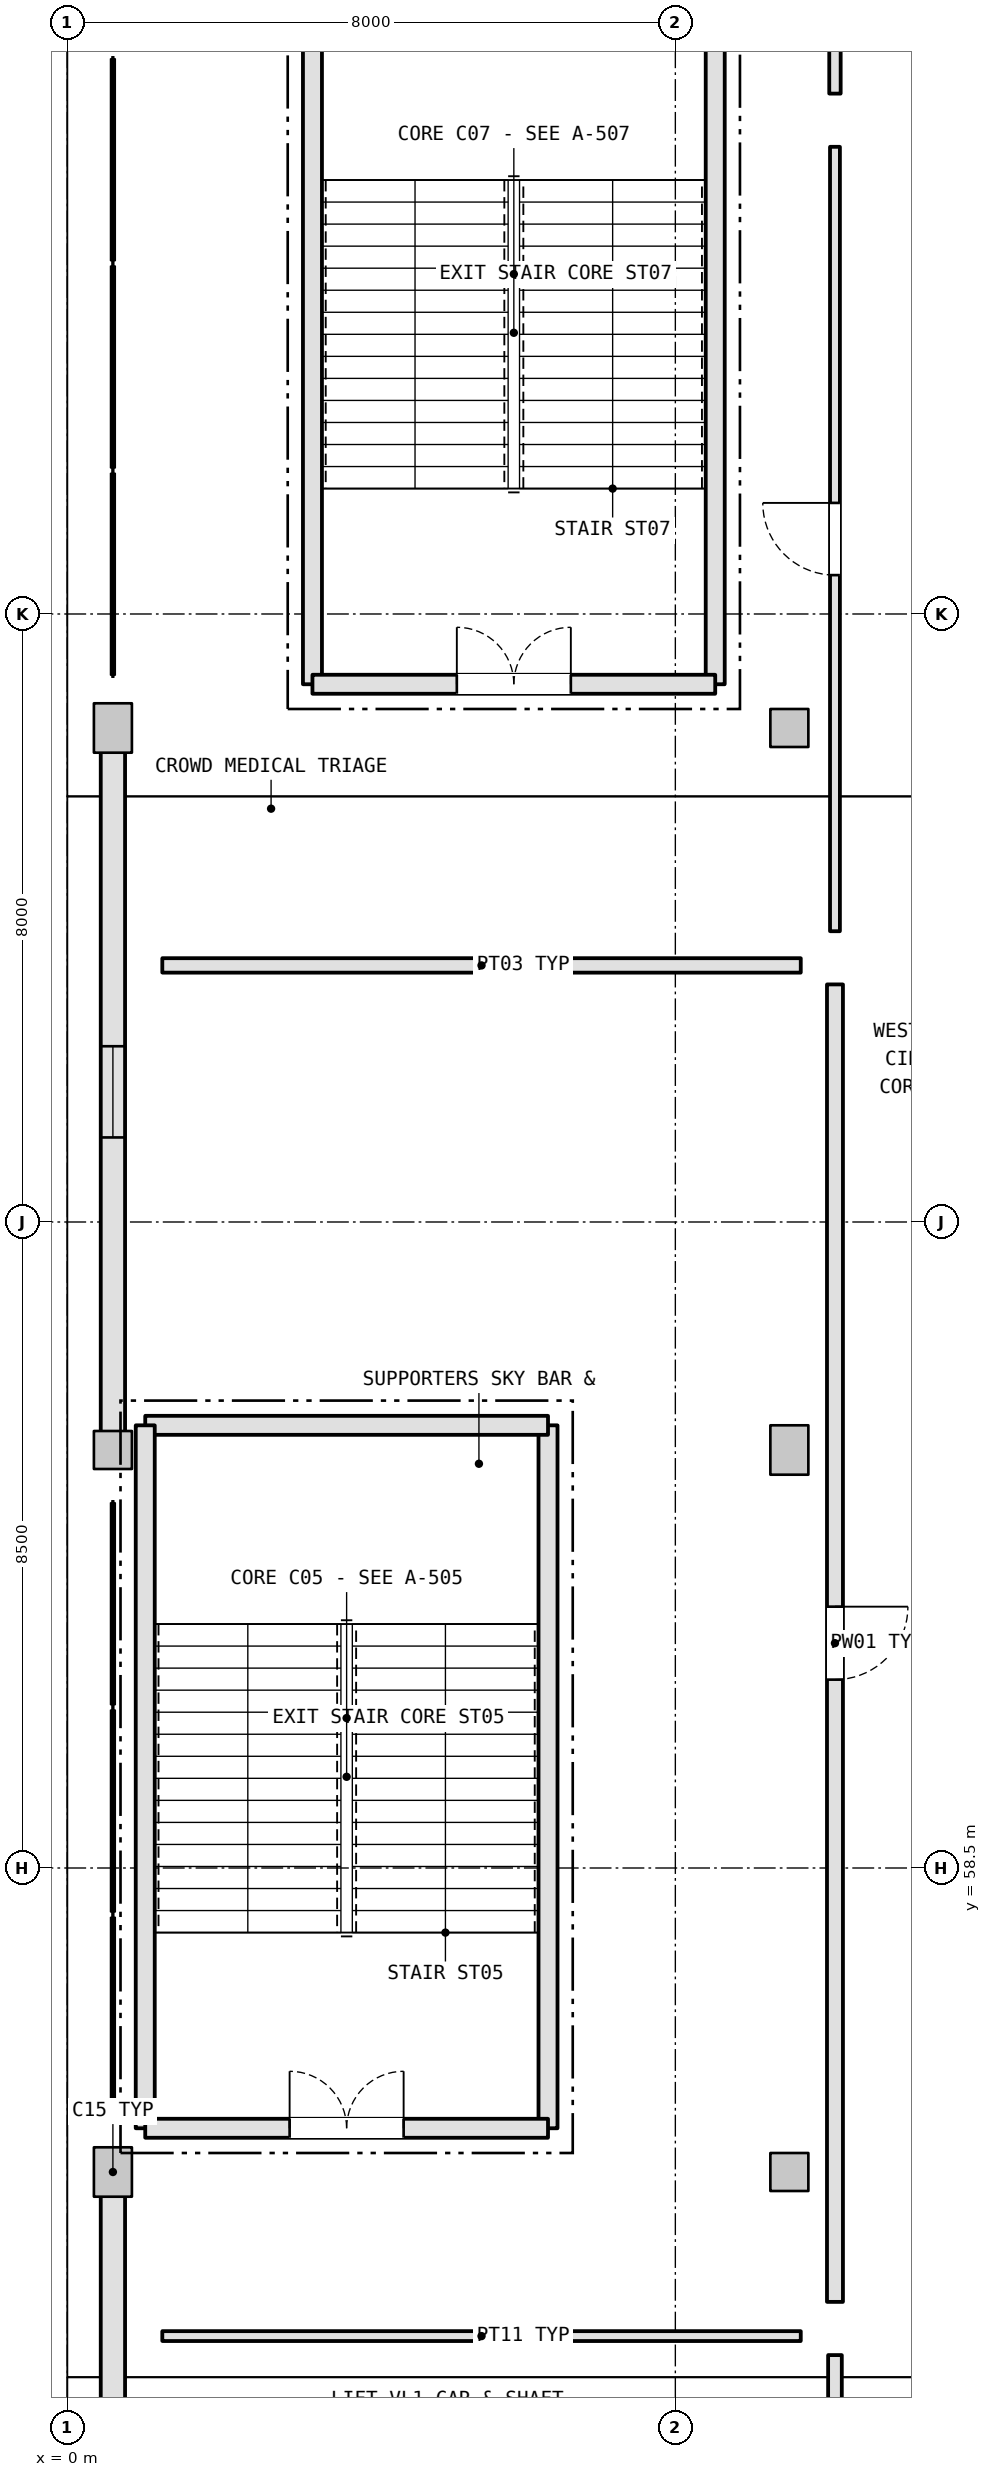
"""IFC4 building model, lengths in metres.
Left out: names, types, materials, properties, quantities, classifications, styles, units other than length and angle.
Written with IfcOpenShell. Run it as: python <this file> out.ifc"""

import sys

from ifc_helpers import new_model, si_unit, direction, frame, frame_2d, origin, origin_2d, place, context, subcontext, project, spatial, rectangle, extrude, element, fill, save


model = new_model("IFC4")
c1 = context("Model", 3, precision=1e-05, world=origin(), true_north=direction((0.0, 1.0)))
c2 = subcontext(c1, "Body", "Model", "MODEL_VIEW")
j1 = project(units=[si_unit("LENGTHUNIT", "METRE"), si_unit("PLANEANGLEUNIT", "RADIAN")], contexts=[c1])
p1 = place(None, origin())
s1 = spatial("IfcSite", under=j1, at=p1, CompositionType="ELEMENT")
p2 = place(p1, origin())
s2 = spatial("IfcBuilding", under=s1, at=p2, CompositionType="ELEMENT")
p3 = place(p2, frame((0.0, 0.0, 21.6)))
s3 = spatial("IfcBuildingStorey", under=s2, at=p3, CompositionType="ELEMENT", Elevation=21.6)
p4 = place(p3, frame((0.6, 54.5, 0.0), z_axis=(0.0, 0.0, 1.0), x_axis=(1.0, 0.0, 0.0)))
e1 = element("IfcColumn", 1, at=p4, inside=s3, PredefinedType="COLUMN", context=c2, shape_type="SweptSolid", body=[
    extrude(rectangle(XDim=0.5, YDim=0.65, at=origin_2d()), origin(), (0.0, 0.0, 1.0), 5.4),
])
p5 = place(p3, frame((0.6, 64.0, 0.0), z_axis=(0.0, 0.0, 1.0), x_axis=(1.0, 0.0, 0.0)))
e2 = element("IfcColumn", 2, at=p5, inside=s3, PredefinedType="COLUMN", context=c2, shape_type="SweptSolid", body=[
    extrude(rectangle(XDim=0.5, YDim=0.5, at=origin_2d()), origin(), (0.0, 0.0, 1.0), 5.4),
])
p6 = place(p3, frame((0.6, 73.5, 0.0), z_axis=(0.0, 0.0, 1.0), x_axis=(1.0, 0.0, 0.0)))
e3 = element("IfcColumn", 3, at=p6, inside=s3, PredefinedType="COLUMN", context=c2, shape_type="SweptSolid", body=[
    extrude(rectangle(XDim=0.5, YDim=0.65, at=origin_2d()), origin(), (0.0, 0.0, 1.0), 5.4),
])
p7 = place(p3, frame((9.5, 54.5, 0.0), z_axis=(0.0, 0.0, 1.0), x_axis=(1.0, 0.0, 0.0)))
e4 = element("IfcColumn", 4, at=p7, inside=s3, PredefinedType="COLUMN", context=c2, shape_type="SweptSolid", body=[
    extrude(rectangle(XDim=0.5, YDim=0.5, at=origin_2d()), origin(), (0.0, 0.0, 1.0), 5.4),
])
p8 = place(p3, frame((9.5, 64.0, 0.0), z_axis=(0.0, 0.0, 1.0), x_axis=(1.0, 0.0, 0.0)))
e5 = element("IfcColumn", 5, at=p8, inside=s3, PredefinedType="COLUMN", context=c2, shape_type="SweptSolid", body=[
    extrude(rectangle(XDim=0.5, YDim=0.65, at=origin_2d()), origin(), (0.0, 0.0, 1.0), 5.4),
])
p9 = place(p3, frame((9.5, 73.5, 0.0), z_axis=(0.0, 0.0, 1.0), x_axis=(1.0, 0.0, 0.0)))
e6 = element("IfcColumn", 6, at=p9, inside=s3, PredefinedType="COLUMN", context=c2, shape_type="SweptSolid", body=[
    extrude(rectangle(XDim=0.5, YDim=0.5, at=origin_2d()), origin(), (0.0, 0.0, 1.0), 5.4),
])
p10 = place(p3, frame((0.6, 45.238, 0.0), z_axis=(0.0, 0.0, 1.0), x_axis=(0.0, 1.0, 0.0)))
e7 = element("IfcWall", 7, at=p10, inside=s3, PredefinedType="SOLIDWALL", context=c2, shape_type="SweptSolid", body=[
    extrude(rectangle(XDim=8.949, YDim=0.32, at=frame_2d((4.475, 0.0))), origin(), (0.0, 0.0, 1.0), 4.465),
])
p11 = place(p10, frame((3.875, 0.0, 1.05)))
e8 = element("IfcOpeningElement", 8, at=p11, cuts=e7, PredefinedType="OPENING", context=c2, shape_type="SweptSolid", body=[
    extrude(rectangle(XDim=1.2, YDim=2.0, at=frame_2d((0.6, 1.0))), frame((0.0, 0.17, 0.0), z_axis=(0.0, -1.0, 0.0), x_axis=(1.0, 0.0, 0.0)), (0.0, 0.0, 1.0), 0.34),
])
p12 = place(p3, frame((0.6, 64.238, 0.0), z_axis=(0.0, 0.0, 1.0), x_axis=(0.0, 1.0, 0.0)))
e9 = element("IfcWall", 9, at=p12, inside=s3, PredefinedType="SOLIDWALL", context=c2, shape_type="SweptSolid", body=[
    extrude(rectangle(XDim=8.949, YDim=0.32, at=frame_2d((4.475, 0.0))), origin(), (0.0, 0.0, 1.0), 4.485),
])
p13 = place(p12, frame((3.875, 0.0, 1.05)))
e10 = element("IfcOpeningElement", 10, at=p13, cuts=e9, PredefinedType="OPENING", context=c2, shape_type="SweptSolid", body=[
    extrude(rectangle(XDim=1.2, YDim=2.0, at=frame_2d((0.6, 1.0))), frame((0.0, 0.17, 0.0), z_axis=(0.0, -1.0, 0.0), x_axis=(1.0, 0.0, 0.0)), (0.0, 0.0, 1.0), 0.34),
])
p14 = place(p3, frame((6.325, 55.075, 0.0), z_axis=(0.0, 0.0, 1.0), x_axis=(0.0, 1.0, 0.0)))
e11 = element("IfcWall", 11, at=p14, inside=s3, PredefinedType="SHEAR", context=c2, shape_type="SweptSolid", body=[
    extrude(rectangle(XDim=9.249, YDim=0.25, at=frame_2d((4.625, 0.0))), origin(), (0.0, 0.0, 1.0), 5.15),
])
p15 = place(p3, frame((6.325, 64.325, 0.0), z_axis=(0.0, 0.0, 1.0), x_axis=(-1.0, 0.0, 0.0)))
e12 = element("IfcWall", 12, at=p15, inside=s3, PredefinedType="SHEAR", context=c2, shape_type="SweptSolid", body=[
    extrude(rectangle(XDim=5.299, YDim=0.25, at=frame_2d((2.65, 0.0))), origin(), (0.0, 0.0, 1.0), 5.15),
])
p16 = place(p3, frame((1.025, 64.325, 0.0), z_axis=(0.0, 0.0, 1.0), x_axis=(0.0, -1.0, 0.0)))
e13 = element("IfcWall", 13, at=p16, inside=s3, PredefinedType="SHEAR", context=c2, shape_type="SweptSolid", body=[
    extrude(rectangle(XDim=9.249, YDim=0.25, at=frame_2d((4.625, 0.0))), origin(), (0.0, 0.0, 1.0), 5.15),
])
p17 = place(p3, frame((1.025, 55.075, 0.0), z_axis=(0.0, 0.0, 1.0), x_axis=(1.0, 0.0, 0.0)))
e14 = element("IfcWall", 14, at=p17, inside=s3, PredefinedType="SHEAR", context=c2, shape_type="SweptSolid", body=[
    extrude(rectangle(XDim=5.299, YDim=0.25, at=frame_2d((2.65, 0.0))), origin(), (0.0, 0.0, 1.0), 5.15),
])
p18 = place(p17, frame((1.9, 0.0, 0.0)))
e15 = element("IfcOpeningElement", 15, at=p18, cuts=e14, PredefinedType="OPENING", context=c2, shape_type="SweptSolid", body=[
    extrude(rectangle(XDim=1.5, YDim=2.2, at=frame_2d((0.75, 1.1))), frame((0.0, 0.135, 0.0), z_axis=(0.0, -1.0, 0.0), x_axis=(1.0, 0.0, 0.0)), (0.0, 0.0, 1.0), 0.27),
])
for number, where, z_axis, x_axis in (
    (16, (8.525, 74.075, 0.0), (0.0, 0.0, 1.0), (0.0, 1.0, 0.0)),
    (17, (3.225, 83.325, 0.0), (0.0, 0.0, 1.0), (0.0, -1.0, 0.0)),
):
    element("IfcWall", number, at=place(p3, frame(where, z_axis=z_axis, x_axis=x_axis)), inside=s3, PredefinedType="SHEAR", context=c2, shape_type="SweptSolid", body=[
        extrude(rectangle(XDim=9.249, YDim=0.25, at=frame_2d((4.625, 0.0))), origin(), (0.0, 0.0, 1.0), 5.15),
    ])
p19 = place(p3, frame((3.225, 74.075, 0.0), z_axis=(0.0, 0.0, 1.0), x_axis=(1.0, 0.0, 0.0)))
e18 = element("IfcWall", 18, at=p19, inside=s3, PredefinedType="SHEAR", context=c2, shape_type="SweptSolid", body=[
    extrude(rectangle(XDim=5.299, YDim=0.25, at=frame_2d((2.65, 0.0))), origin(), (0.0, 0.0, 1.0), 5.15),
])
p20 = place(p19, frame((1.9, 0.0, 0.0)))
e19 = element("IfcOpeningElement", 19, at=p20, cuts=e18, PredefinedType="OPENING", context=c2, shape_type="SweptSolid", body=[
    extrude(rectangle(XDim=1.5, YDim=2.2, at=frame_2d((0.75, 1.1))), frame((0.0, 0.135, 0.0), z_axis=(0.0, -1.0, 0.0), x_axis=(1.0, 0.0, 0.0)), (0.0, 0.0, 1.0), 0.27),
])
p21 = place(p3, frame((10.1, 52.091, 0.0), z_axis=(0.0, 0.0, 1.0), x_axis=(0.0, -1.0, 0.0)))
e20 = element("IfcWall", 20, at=p21, inside=s3, PredefinedType="PARTITIONING", context=c2, shape_type="SweptSolid", body=[
    extrude(rectangle(XDim=20.341, YDim=0.18, at=frame_2d((10.17, 0.0))), origin(), (0.0, 0.0, 1.0), 4.646),
])
p22 = place(p21, frame((9.545, 0.0, 0.0)))
e21 = element("IfcOpeningElement", 21, at=p22, cuts=e20, PredefinedType="OPENING", context=c2, shape_type="SweptSolid", body=[
    extrude(rectangle(XDim=1.25, YDim=2.2, at=frame_2d((0.625, 1.1))), frame((0.0, 0.1, 0.0), z_axis=(0.0, -1.0, 0.0), x_axis=(1.0, 0.0, 0.0)), (0.0, 0.0, 1.0), 0.2),
])
p23 = place(p3, frame((1.25, 52.341, 0.0), z_axis=(0.0, 0.0, 1.0), x_axis=(1.0, 0.0, 0.0)))
e22 = element("IfcWall", 22, at=p23, inside=s3, PredefinedType="PARTITIONING", context=c2, shape_type="SweptSolid", body=[
    extrude(rectangle(XDim=8.4, YDim=0.13, at=frame_2d((4.2, 0.0))), origin(), (0.0, 0.0, 1.0), 4.465),
])
p24 = place(p3, frame((10.1, 70.126, 0.0), z_axis=(0.0, 0.0, 1.0), x_axis=(0.0, -1.0, 0.0)))
e23 = element("IfcWall", 23, at=p24, inside=s3, PredefinedType="PLUMBINGWALL", context=c2, shape_type="SweptSolid", body=[
    extrude(rectangle(XDim=17.335, YDim=0.21, at=frame_2d((8.667, 0.0))), origin(), (0.0, 0.0, 1.0), 4.666),
])
p25 = place(p24, frame((8.188, 0.0, 0.0)))
e24 = element("IfcOpeningElement", 24, at=p25, cuts=e23, PredefinedType="OPENING", context=c2, shape_type="SweptSolid", body=[
    extrude(rectangle(XDim=0.96, YDim=2.15, at=frame_2d((0.48, 1.075))), frame((0.0, 0.115, 0.0), z_axis=(0.0, -1.0, 0.0), x_axis=(1.0, 0.0, 0.0)), (0.0, 0.0, 1.0), 0.23),
])
p26 = place(p3, frame((1.25, 70.376, 0.0), z_axis=(0.0, 0.0, 1.0), x_axis=(1.0, 0.0, 0.0)))
e25 = element("IfcWall", 25, at=p26, inside=s3, PredefinedType="PARTITIONING", context=c2, shape_type="SweptSolid", body=[
    extrude(rectangle(XDim=8.4, YDim=0.19, at=frame_2d((4.2, 0.0))), origin(), (0.0, 0.0, 1.0), 4.485),
])
p27 = place(p3, frame((10.1, 81.147, 0.0), z_axis=(0.0, 0.0, 1.0), x_axis=(0.0, -1.0, 0.0)))
e26 = element("IfcWall", 26, at=p27, inside=s3, PredefinedType="PARTITIONING", context=c2, shape_type="SweptSolid", body=[
    extrude(rectangle(XDim=10.321, YDim=0.13, at=frame_2d((5.161, 0.0))), origin(), (0.0, 0.0, 1.0), 4.666),
])
p28 = place(p27, frame((4.686, 0.0, 0.0)))
e27 = element("IfcOpeningElement", 27, at=p28, cuts=e26, PredefinedType="OPENING", context=c2, shape_type="SweptSolid", body=[
    extrude(rectangle(XDim=0.95, YDim=2.15, at=frame_2d((0.475, 1.075))), frame((0.0, 0.075, 0.0), z_axis=(0.0, -1.0, 0.0), x_axis=(1.0, 0.0, 0.0)), (0.0, 0.0, 1.0), 0.15),
])
p29 = place(p3, frame((10.1, 91.166, 0.0), z_axis=(0.0, 0.0, 1.0), x_axis=(0.0, -1.0, 0.0)))
e28 = element("IfcWall", 28, at=p29, inside=s3, PredefinedType="PARTITIONING", context=c2, shape_type="SweptSolid", body=[
    extrude(rectangle(XDim=9.319, YDim=0.15, at=frame_2d((4.66, 0.0))), origin(), (0.0, 0.0, 1.0), 4.666),
])
p30 = place(p29, frame((4.119, 0.0, 0.0)))
e29 = element("IfcOpeningElement", 29, at=p30, cuts=e28, PredefinedType="OPENING", context=c2, shape_type="SweptSolid", body=[
    extrude(rectangle(XDim=1.08, YDim=2.25, at=frame_2d((0.54, 1.125))), frame((0.0, 0.085, 0.0), z_axis=(0.0, -1.0, 0.0), x_axis=(1.0, 0.0, 0.0)), (0.0, 0.0, 1.0), 0.17),
])
p31 = place(p13, origin())
e30 = element("IfcWindow", 30, at=p31, inside=s3, PartitioningType="SINGLE_PANEL", PredefinedType="WINDOW", context=c2, shape_type="SweptSolid", body=[
    extrude(rectangle(XDim=1.2, YDim=2.0, at=frame_2d((0.6, 1.0))), frame((0.0, 0.03, 0.0), z_axis=(0.0, -1.0, 0.0), x_axis=(1.0, 0.0, 0.0)), (0.0, 0.0, 1.0), 0.06),
])
fill(e10, e30)
p32 = place(p18, origin())
e31 = element("IfcDoor", 31, at=p32, inside=s3, OperationType="DOUBLE_DOOR_SINGLE_SWING", PredefinedType="DOOR", context=c2, shape_type="SweptSolid", body=[
    extrude(rectangle(XDim=1.5, YDim=2.2, at=frame_2d((0.75, 1.1))), frame((0.0, 0.025, 0.0), z_axis=(0.0, -1.0, 0.0), x_axis=(1.0, 0.0, 0.0)), (0.0, 0.0, 1.0), 0.05),
])
fill(e15, e31)
p33 = place(p20, origin())
e32 = element("IfcDoor", 32, at=p33, inside=s3, OperationType="DOUBLE_DOOR_SINGLE_SWING", PredefinedType="DOOR", context=c2, shape_type="SweptSolid", body=[
    extrude(rectangle(XDim=1.5, YDim=2.2, at=frame_2d((0.75, 1.1))), frame((0.0, 0.025, 0.0), z_axis=(0.0, -1.0, 0.0), x_axis=(1.0, 0.0, 0.0)), (0.0, 0.0, 1.0), 0.05),
])
fill(e19, e32)
p34 = place(p25, origin())
e33 = element("IfcDoor", 33, at=p34, inside=s3, OperationType="SINGLE_SWING_LEFT", PredefinedType="DOOR", context=c2, shape_type="SweptSolid", body=[
    extrude(rectangle(XDim=0.96, YDim=2.15, at=frame_2d((0.48, 1.075))), frame((0.0, 0.025, 0.0), z_axis=(0.0, -1.0, 0.0), x_axis=(1.0, 0.0, 0.0)), (0.0, 0.0, 1.0), 0.05),
])
fill(e24, e33)
p35 = place(p28, frame((0.95, 0.0, 0.0), z_axis=(0.0, 0.0, 1.0), x_axis=(-1.0, 0.0, 0.0)))
e34 = element("IfcDoor", 34, at=p35, inside=s3, OperationType="SINGLE_SWING_LEFT", PredefinedType="DOOR", context=c2, shape_type="SweptSolid", body=[
    extrude(rectangle(XDim=0.95, YDim=2.15, at=frame_2d((0.475, 1.075))), frame((0.0, 0.025, 0.0), z_axis=(0.0, -1.0, 0.0), x_axis=(1.0, 0.0, 0.0)), (0.0, 0.0, 1.0), 0.05),
])
fill(e27, e34)
save(model, sys.argv[1])
